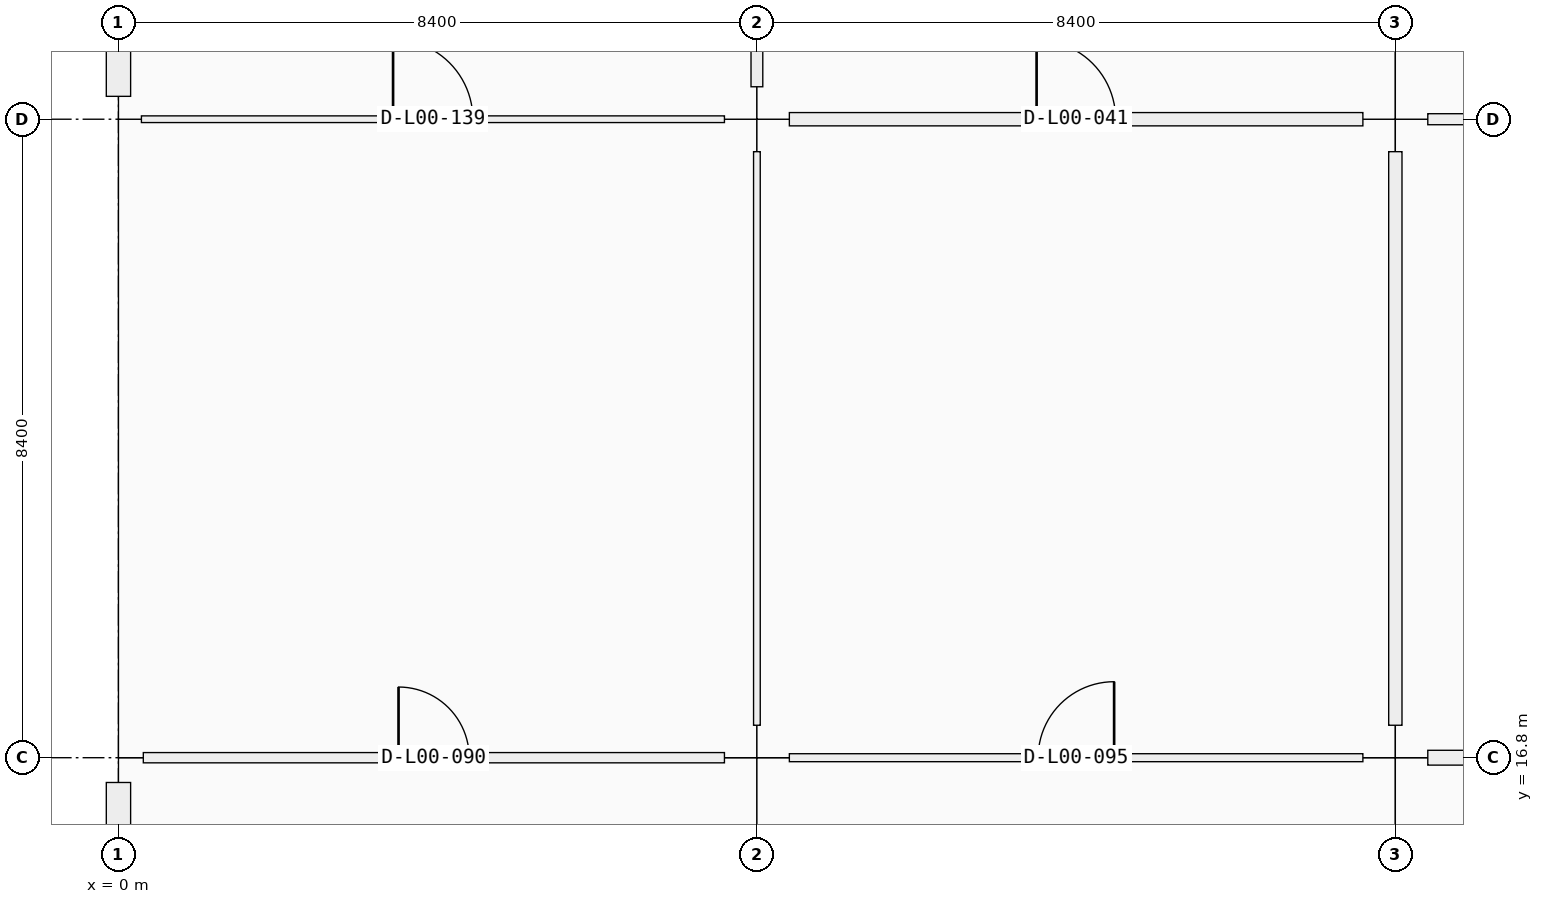
"""IFC4 building model, lengths in metres.
Left out: names, types, materials, properties, quantities, classifications, styles, units other than length and angle.
Written with IfcOpenShell. Run it as: python <this file> out.ifc"""

import sys

from ifc_helpers import new_model, si_unit, direction, frame, frame_2d, origin, origin_2d, place, context, subcontext, project, spatial, rectangle, extrude, element, fill, save


model = new_model("IFC4")
c1 = context("Model", 3, precision=1e-05, world=origin(), true_north=direction((0.0, 1.0)))
c2 = subcontext(c1, "Body", "Model", "MODEL_VIEW")
j1 = project(units=[si_unit("LENGTHUNIT", "METRE"), si_unit("PLANEANGLEUNIT", "RADIAN")], contexts=[c1])
p1 = place(None, origin())
s1 = spatial("IfcSite", under=j1, at=p1, CompositionType="ELEMENT")
p2 = place(p1, origin())
s2 = spatial("IfcBuilding", under=s1, at=p2, CompositionType="ELEMENT")
p3 = place(p2, origin())
s3 = spatial("IfcBuildingStorey", under=s2, at=p3, CompositionType="ELEMENT", Elevation=0.0)
p4 = place(p3, frame((0.0, 16.8, 0.0), z_axis=(0.0, 0.0, 1.0), x_axis=(1.0, 0.0, 0.0)))
e1 = element("IfcColumn", 1, at=p4, inside=s3, PredefinedType="COLUMN", context=c2, shape_type="SweptSolid", body=[
    extrude(rectangle(XDim=0.65, YDim=0.65, at=origin_2d()), origin(), (0.0, 0.0, 1.0), 5.76),
])
p5 = place(p3, frame((0.0, 25.2, 0.0), z_axis=(0.0, 0.0, 1.0), x_axis=(1.0, 0.0, 0.0)))
e2 = element("IfcColumn", 2, at=p5, inside=s3, PredefinedType="COLUMN", context=c2, shape_type="SweptSolid", body=[
    extrude(rectangle(XDim=0.6, YDim=0.6, at=origin_2d()), origin(), (0.0, 0.0, 1.0), 5.76),
])
for number, where, z_axis, x_axis in (
    (3, (8.4, 16.8, 0.0), (0.0, 0.0, 1.0), (1.0, 0.0, 0.0)),
    (4, (8.4, 25.2, 0.0), (0.0, 0.0, 1.0), (1.0, 0.0, 0.0)),
    (5, (16.8, 16.8, 0.0), (0.0, 0.0, 1.0), (1.0, 0.0, 0.0)),
    (6, (16.8, 25.2, 0.0), (0.0, 0.0, 1.0), (1.0, 0.0, 0.0)),
):
    element("IfcColumn", number, at=place(p3, frame(where, z_axis=z_axis, x_axis=x_axis)), inside=s3, PredefinedType="COLUMN", context=c2, shape_type="SweptSolid", body=[
        extrude(rectangle(XDim=0.85, YDim=0.85, at=origin_2d()), origin(), (0.0, 0.0, 1.0), 5.76),
    ])
p6 = place(p3, frame((0.0, 8.701, 0.0), z_axis=(0.0, 0.0, 1.0), x_axis=(0.0, 1.0, 0.0)))
e7 = element("IfcWall", 7, at=p6, inside=s3, PredefinedType="SOLIDWALL", context=c2, shape_type="SweptSolid", body=[
    extrude(rectangle(XDim=7.773, YDim=0.32, at=frame_2d((3.887, 0.0))), origin(), (0.0, 0.0, 1.0), 4.7),
])
p7 = place(p6, frame((2.837, 0.0, 0.9)))
e8 = element("IfcOpeningElement", 8, at=p7, cuts=e7, PredefinedType="OPENING", context=c2, shape_type="SweptSolid", body=[
    extrude(rectangle(XDim=2.1, YDim=1.8, at=frame_2d((1.05, 0.9))), frame((0.0, 0.16, 0.0), z_axis=(0.0, -1.0, 0.0), x_axis=(1.0, 0.0, 0.0)), (0.0, 0.0, 1.0), 0.32),
])
p8 = place(p3, frame((0.0, 25.501, 0.0), z_axis=(0.0, 0.0, 1.0), x_axis=(0.0, 1.0, 0.0)))
e9 = element("IfcWall", 9, at=p8, inside=s3, PredefinedType="SOLIDWALL", context=c2, shape_type="SweptSolid", body=[
    extrude(rectangle(XDim=7.773, YDim=0.32, at=frame_2d((3.886, 0.0))), origin(), (0.0, 0.0, 1.0), 4.7),
])
p9 = place(p8, frame((2.786, 0.0, 0.0)))
e10 = element("IfcOpeningElement", 10, at=p9, cuts=e9, PredefinedType="OPENING", context=c2, shape_type="SweptSolid", body=[
    extrude(rectangle(XDim=2.2, YDim=2.3, at=frame_2d((1.1, 1.15))), frame((0.0, 0.16, 0.0), z_axis=(0.0, -1.0, 0.0), x_axis=(1.0, 0.0, 0.0)), (0.0, 0.0, 1.0), 0.32),
])
p10 = place(p3, frame((0.327, 16.8, 0.0), z_axis=(0.0, 0.0, 1.0), x_axis=(1.0, 0.0, 0.0)))
e11 = element("IfcWall", 11, at=p10, inside=s3, PredefinedType="PARTITIONING", context=c2, shape_type="SweptSolid", body=[
    extrude(rectangle(XDim=7.646, YDim=0.135, at=frame_2d((3.823, 0.0))), origin(), (0.0, 0.0, 1.0), 3.66),
])
p11 = place(p10, frame((3.358, 0.0, 0.0)))
e12 = element("IfcOpeningElement", 12, at=p11, cuts=e11, PredefinedType="OPENING", context=c2, shape_type="SweptSolid", body=[
    extrude(rectangle(XDim=0.93, YDim=2.12, at=frame_2d((0.465, 1.06))), frame((0.0, 0.067, 0.0), z_axis=(0.0, -1.0, 0.0), x_axis=(1.0, 0.0, 0.0)), (0.0, 0.0, 1.0), 0.135),
])
p12 = place(p3, frame((0.302, 25.2, 0.0), z_axis=(0.0, 0.0, 1.0), x_axis=(1.0, 0.0, 0.0)))
e13 = element("IfcWall", 13, at=p12, inside=s3, PredefinedType="PARTITIONING", context=c2, shape_type="SweptSolid", body=[
    extrude(rectangle(XDim=7.671, YDim=0.088, at=frame_2d((3.835, 0.0))), origin(), (0.0, 0.0, 1.0), 3.66),
])
p13 = place(p12, frame((3.311, 0.0, 0.0)))
e14 = element("IfcOpeningElement", 14, at=p13, cuts=e13, PredefinedType="OPENING", context=c2, shape_type="SweptSolid", body=[
    extrude(rectangle(XDim=1.05, YDim=2.12, at=frame_2d((0.525, 1.06))), frame((0.0, 0.044, 0.0), z_axis=(0.0, -1.0, 0.0), x_axis=(1.0, 0.0, 0.0)), (0.0, 0.0, 1.0), 0.088),
])
p14 = place(p3, frame((8.827, 16.8, 0.0), z_axis=(0.0, 0.0, 1.0), x_axis=(1.0, 0.0, 0.0)))
e15 = element("IfcWall", 15, at=p14, inside=s3, PredefinedType="PARTITIONING", context=c2, shape_type="SweptSolid", body=[
    extrude(rectangle(XDim=7.546, YDim=0.105, at=frame_2d((3.773, 0.0))), origin(), (0.0, 0.0, 1.0), 3.66),
])
p15 = place(p14, frame((3.273, 0.0, 0.0)))
e16 = element("IfcOpeningElement", 16, at=p15, cuts=e15, PredefinedType="OPENING", context=c2, shape_type="SweptSolid", body=[
    extrude(rectangle(XDim=1.0, YDim=2.2, at=frame_2d((0.5, 1.1))), frame((0.0, 0.052, 0.0), z_axis=(0.0, -1.0, 0.0), x_axis=(1.0, 0.0, 0.0)), (0.0, 0.0, 1.0), 0.105),
])
p16 = place(p3, frame((8.827, 25.2, 0.0), z_axis=(0.0, 0.0, 1.0), x_axis=(1.0, 0.0, 0.0)))
e17 = element("IfcWall", 17, at=p16, inside=s3, PredefinedType="PARTITIONING", context=c2, shape_type="SweptSolid", body=[
    extrude(rectangle(XDim=7.546, YDim=0.175, at=frame_2d((3.773, 0.0))), origin(), (0.0, 0.0, 1.0), 3.66),
])
p17 = place(p16, frame((3.253, 0.0, 0.0)))
e18 = element("IfcOpeningElement", 18, at=p17, cuts=e17, PredefinedType="OPENING", context=c2, shape_type="SweptSolid", body=[
    extrude(rectangle(XDim=1.04, YDim=2.2, at=frame_2d((0.52, 1.1))), frame((0.0, 0.087, 0.0), z_axis=(0.0, -1.0, 0.0), x_axis=(1.0, 0.0, 0.0)), (0.0, 0.0, 1.0), 0.175),
])
p18 = place(p3, frame((17.227, 16.8, 0.0), z_axis=(0.0, 0.0, 1.0), x_axis=(1.0, 0.0, 0.0)))
e19 = element("IfcWall", 19, at=p18, inside=s3, PredefinedType="PARTITIONING", context=c2, shape_type="SweptSolid", body=[
    extrude(rectangle(XDim=7.546, YDim=0.195, at=frame_2d((3.773, 0.0))), origin(), (0.0, 0.0, 1.0), 3.66),
])
p19 = place(p18, frame((3.283, 0.0, 0.0)))
e20 = element("IfcOpeningElement", 20, at=p19, cuts=e19, PredefinedType="OPENING", context=c2, shape_type="SweptSolid", body=[
    extrude(rectangle(XDim=0.98, YDim=2.18, at=frame_2d((0.49, 1.09))), frame((0.0, 0.098, 0.0), z_axis=(0.0, -1.0, 0.0), x_axis=(1.0, 0.0, 0.0)), (0.0, 0.0, 1.0), 0.195),
])
p20 = place(p3, frame((17.227, 25.2, 0.0), z_axis=(0.0, 0.0, 1.0), x_axis=(1.0, 0.0, 0.0)))
e21 = element("IfcWall", 21, at=p20, inside=s3, PredefinedType="PARTITIONING", context=c2, shape_type="SweptSolid", body=[
    extrude(rectangle(XDim=7.546, YDim=0.145, at=frame_2d((3.773, 0.0))), origin(), (0.0, 0.0, 1.0), 3.66),
])
p21 = place(p20, frame((3.273, 0.0, 0.0)))
e22 = element("IfcOpeningElement", 22, at=p21, cuts=e21, PredefinedType="OPENING", context=c2, shape_type="SweptSolid", body=[
    extrude(rectangle(XDim=1.0, YDim=2.2, at=frame_2d((0.5, 1.1))), frame((0.0, 0.073, 0.0), z_axis=(0.0, -1.0, 0.0), x_axis=(1.0, 0.0, 0.0)), (0.0, 0.0, 1.0), 0.145),
])
p22 = place(p3, frame((8.4, 17.227, 0.0), z_axis=(0.0, 0.0, 1.0), x_axis=(0.0, 1.0, 0.0)))
e23 = element("IfcWall", 23, at=p22, inside=s3, PredefinedType="PARTITIONING", context=c2, shape_type="SweptSolid", body=[
    extrude(rectangle(XDim=7.546, YDim=0.088, at=frame_2d((3.773, 0.0))), origin(), (0.0, 0.0, 1.0), 3.66),
])
p23 = place(p22, frame((3.293, 0.0, 0.0)))
e24 = element("IfcOpeningElement", 24, at=p23, cuts=e23, PredefinedType="OPENING", context=c2, shape_type="SweptSolid", body=[
    extrude(rectangle(XDim=0.96, YDim=2.18, at=frame_2d((0.48, 1.09))), frame((0.0, 0.044, 0.0), z_axis=(0.0, -1.0, 0.0), x_axis=(1.0, 0.0, 0.0)), (0.0, 0.0, 1.0), 0.088),
])
p24 = place(p3, frame((8.4, 25.627, 0.0), z_axis=(0.0, 0.0, 1.0), x_axis=(0.0, 1.0, 0.0)))
e25 = element("IfcWall", 25, at=p24, inside=s3, PredefinedType="PARTITIONING", context=c2, shape_type="SweptSolid", body=[
    extrude(rectangle(XDim=7.546, YDim=0.155, at=frame_2d((3.773, 0.0))), origin(), (0.0, 0.0, 1.0), 3.66),
])
p25 = place(p24, frame((3.253, 0.0, 0.0)))
e26 = element("IfcOpeningElement", 26, at=p25, cuts=e25, PredefinedType="OPENING", context=c2, shape_type="SweptSolid", body=[
    extrude(rectangle(XDim=1.04, YDim=2.2, at=frame_2d((0.52, 1.1))), frame((0.0, 0.078, 0.0), z_axis=(0.0, -1.0, 0.0), x_axis=(1.0, 0.0, 0.0)), (0.0, 0.0, 1.0), 0.155),
])
p26 = place(p3, frame((16.8, 17.227, 0.0), z_axis=(0.0, 0.0, 1.0), x_axis=(0.0, 1.0, 0.0)))
e27 = element("IfcWall", 27, at=p26, inside=s3, PredefinedType="PARTITIONING", context=c2, shape_type="SweptSolid", body=[
    extrude(rectangle(XDim=7.546, YDim=0.175, at=frame_2d((3.773, 0.0))), origin(), (0.0, 0.0, 1.0), 3.66),
])
p27 = place(p26, frame((3.313, 0.0, 0.0)))
e28 = element("IfcOpeningElement", 28, at=p27, cuts=e27, PredefinedType="OPENING", context=c2, shape_type="SweptSolid", body=[
    extrude(rectangle(XDim=0.92, YDim=2.15, at=frame_2d((0.46, 1.075))), frame((0.0, 0.087, 0.0), z_axis=(0.0, -1.0, 0.0), x_axis=(1.0, 0.0, 0.0)), (0.0, 0.0, 1.0), 0.175),
])
p28 = place(p17, origin())
e29 = element("IfcDoor", 29, at=p28, inside=s3, OperationType="SINGLE_SWING_LEFT", PredefinedType="DOOR", context=c2, shape_type="SweptSolid", body=[
    extrude(rectangle(XDim=1.04, YDim=2.2, at=frame_2d((0.52, 1.1))), frame((0.0, 0.025, 0.0), z_axis=(0.0, -1.0, 0.0), x_axis=(1.0, 0.0, 0.0)), (0.0, 0.0, 1.0), 0.05),
])
fill(e18, e29)
p29 = place(p11, origin())
e30 = element("IfcDoor", 30, at=p29, inside=s3, OperationType="SINGLE_SWING_LEFT", PredefinedType="DOOR", context=c2, shape_type="SweptSolid", body=[
    extrude(rectangle(XDim=0.93, YDim=2.12, at=frame_2d((0.465, 1.06))), frame((0.0, 0.025, 0.0), z_axis=(0.0, -1.0, 0.0), x_axis=(1.0, 0.0, 0.0)), (0.0, 0.0, 1.0), 0.05),
])
fill(e12, e30)
p30 = place(p15, origin())
e31 = element("IfcDoor", 31, at=p30, inside=s3, OperationType="SINGLE_SWING_RIGHT", PredefinedType="DOOR", context=c2, shape_type="SweptSolid", body=[
    extrude(rectangle(XDim=1.0, YDim=2.2, at=frame_2d((0.5, 1.1))), frame((0.0, 0.025, 0.0), z_axis=(0.0, -1.0, 0.0), x_axis=(1.0, 0.0, 0.0)), (0.0, 0.0, 1.0), 0.05),
])
fill(e16, e31)
p31 = place(p13, origin())
e32 = element("IfcDoor", 32, at=p31, inside=s3, OperationType="SINGLE_SWING_LEFT", PredefinedType="DOOR", context=c2, shape_type="SweptSolid", body=[
    extrude(rectangle(XDim=1.05, YDim=2.12, at=frame_2d((0.525, 1.06))), frame((0.0, 0.025, 0.0), z_axis=(0.0, -1.0, 0.0), x_axis=(1.0, 0.0, 0.0)), (0.0, 0.0, 1.0), 0.05),
])
fill(e14, e32)
p32 = place(p23, origin())
e33 = element("IfcDoor", 33, at=p32, inside=s3, OperationType="SINGLE_SWING_LEFT", PredefinedType="DOOR", context=c2, shape_type="SweptSolid", body=[
    extrude(rectangle(XDim=0.96, YDim=2.18, at=frame_2d((0.48, 1.09))), frame((0.0, 0.025, 0.0), z_axis=(0.0, -1.0, 0.0), x_axis=(1.0, 0.0, 0.0)), (0.0, 0.0, 1.0), 0.05),
])
fill(e24, e33)
p33 = place(p27, origin())
e34 = element("IfcDoor", 34, at=p33, inside=s3, OperationType="SINGLE_SWING_LEFT", PredefinedType="DOOR", context=c2, shape_type="SweptSolid", body=[
    extrude(rectangle(XDim=0.92, YDim=2.15, at=frame_2d((0.46, 1.075))), frame((0.0, 0.025, 0.0), z_axis=(0.0, -1.0, 0.0), x_axis=(1.0, 0.0, 0.0)), (0.0, 0.0, 1.0), 0.05),
])
fill(e28, e34)
save(model, sys.argv[1])
